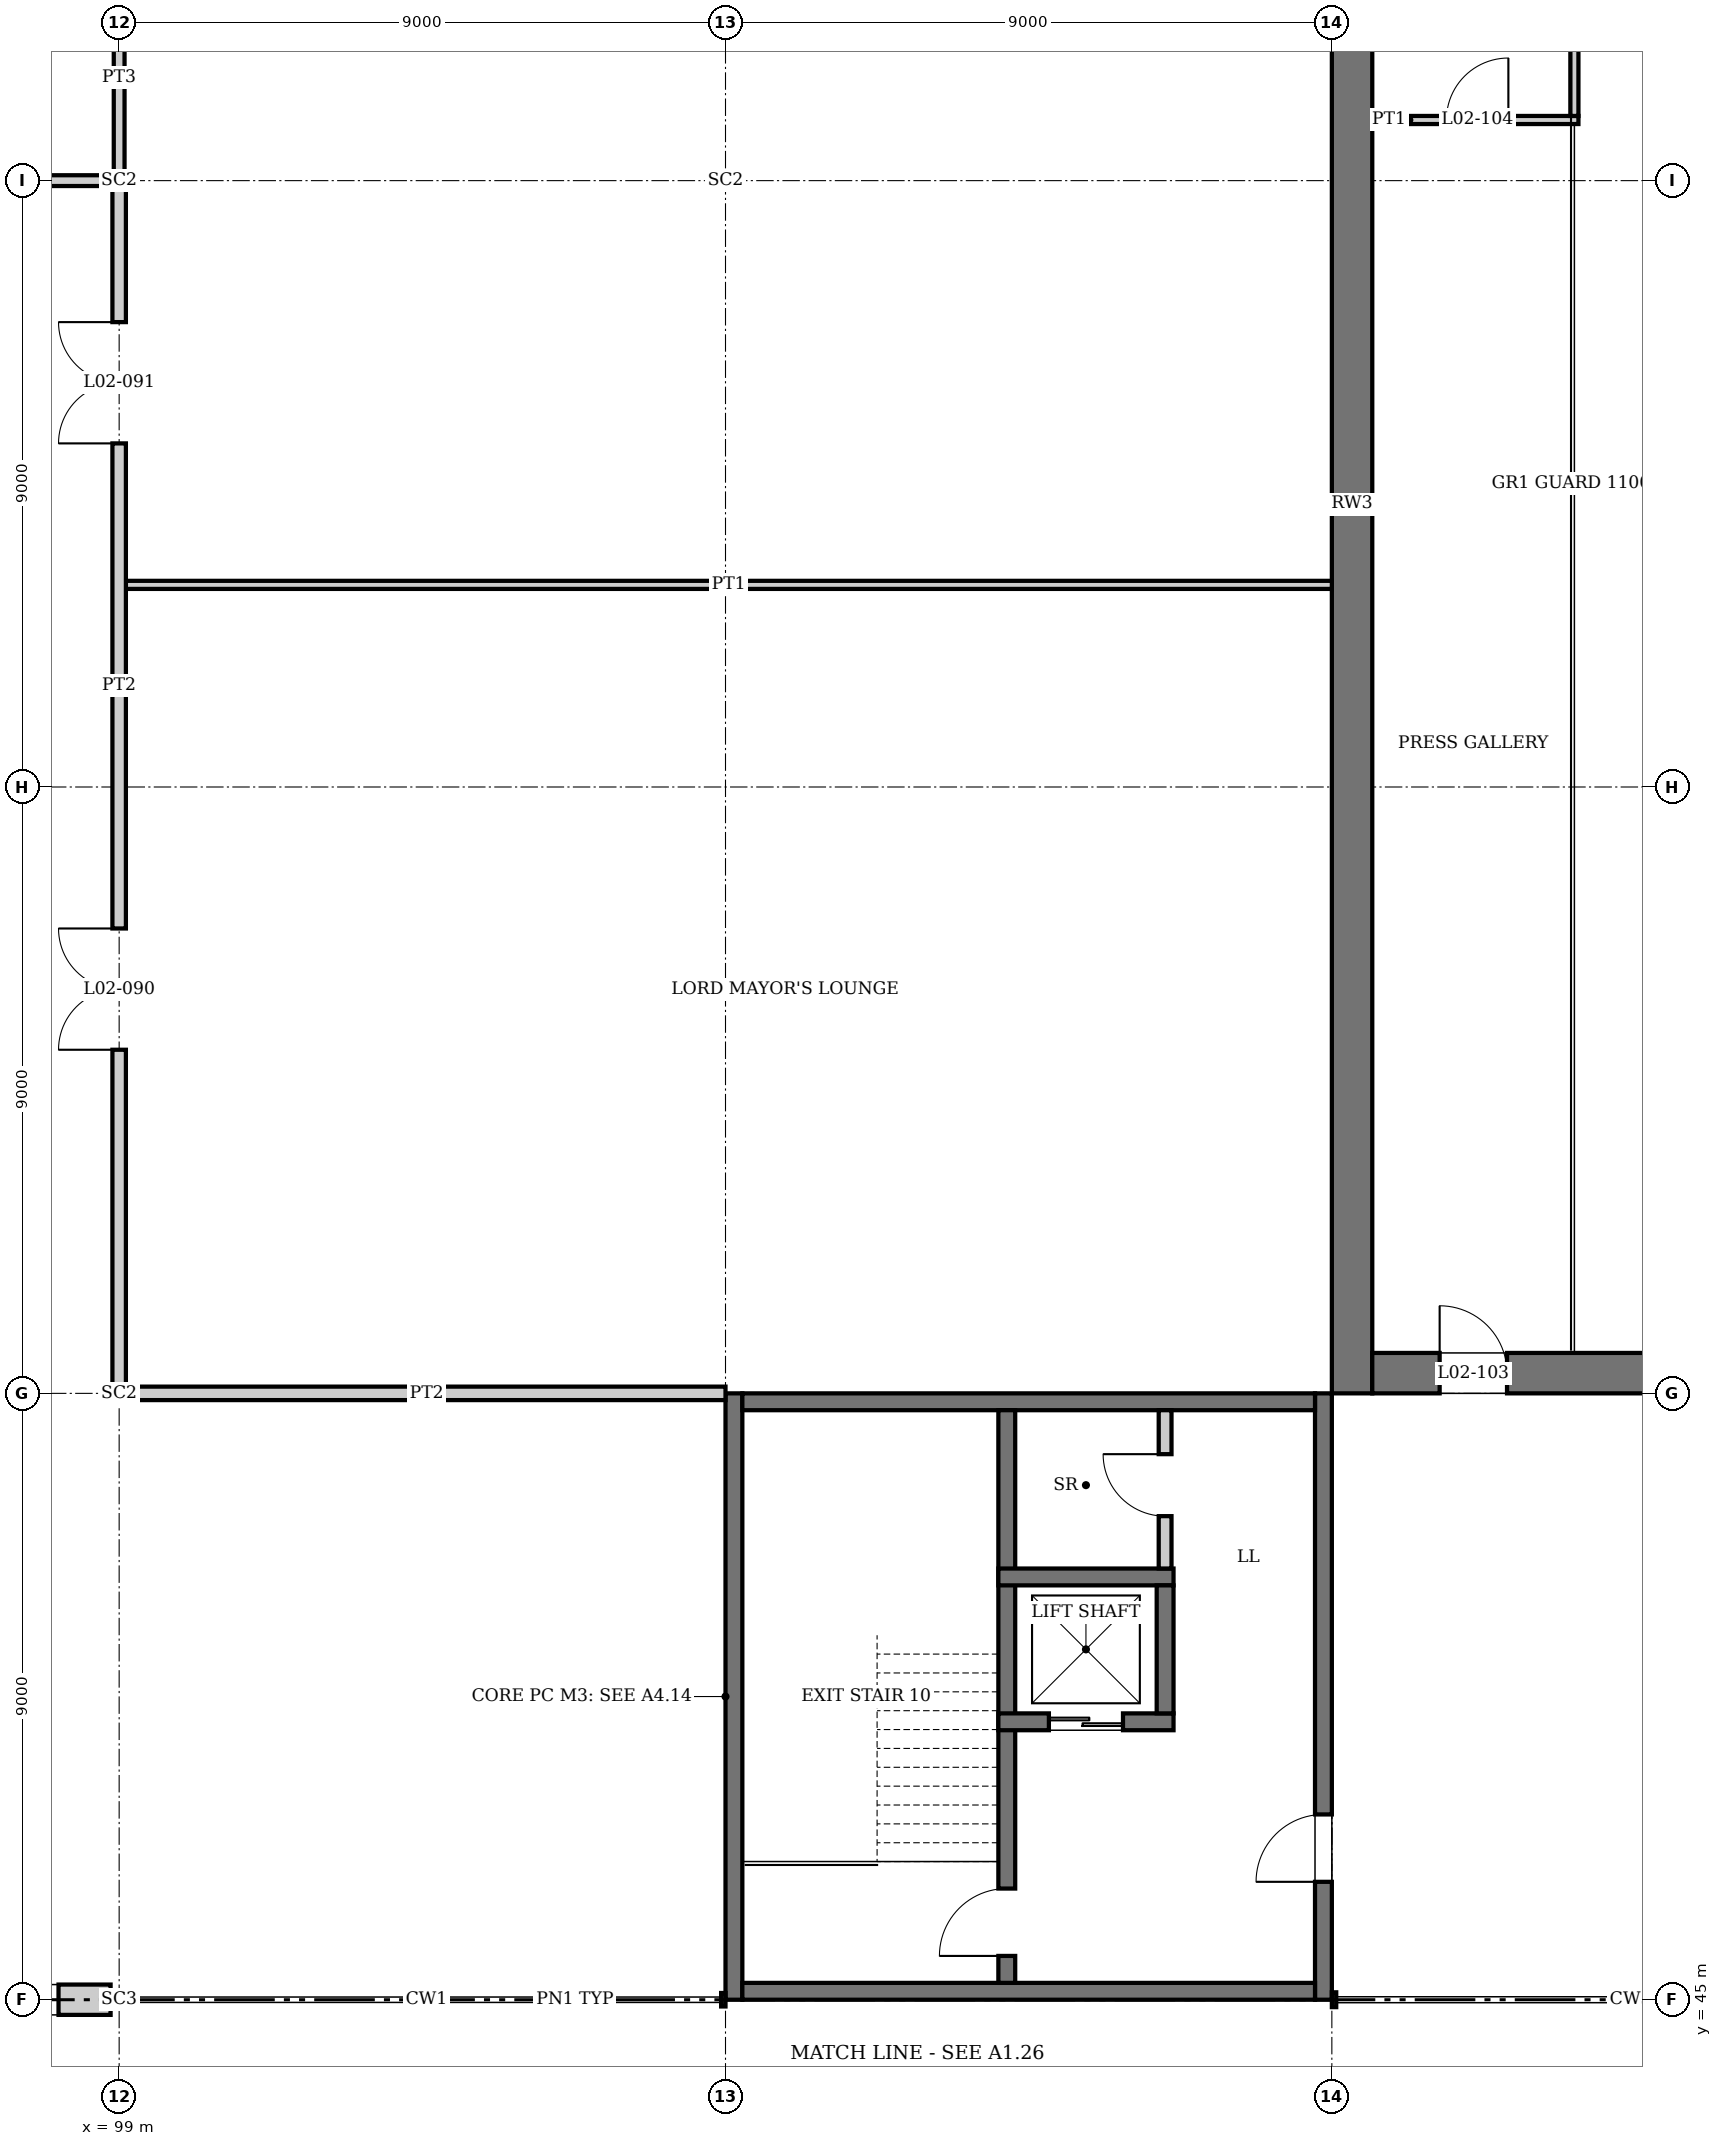
"""IFC4 building model, lengths in metres.
Left out: names, types, materials, properties, quantities, classifications, styles, units other than length and angle.
Written with IfcOpenShell. Run it as: python <this file> out.ifc"""

import sys

from ifc_helpers import new_model, si_unit, direction, frame, frame_2d, origin, origin_2d, place, context, subcontext, project, spatial, rectangle, i_section, extrude, element, fill, save


model = new_model("IFC4")
c1 = context("Model", 3, precision=1e-05, world=origin(), true_north=direction((0.0, 1.0)))
c2 = subcontext(c1, "Body", "Model", "MODEL_VIEW")
j1 = project(units=[si_unit("LENGTHUNIT", "METRE"), si_unit("PLANEANGLEUNIT", "RADIAN")], contexts=[c1])
p1 = place(None, origin())
s1 = spatial("IfcSite", under=j1, at=p1, CompositionType="ELEMENT")
p2 = place(p1, origin())
s2 = spatial("IfcBuilding", under=s1, at=p2, CompositionType="ELEMENT")
p3 = place(p2, frame((0.0, 0.0, 10.5)))
s3 = spatial("IfcBuildingStorey", under=s2, at=p3, CompositionType="ELEMENT", Elevation=10.5)
p4 = place(p3, frame((99.0, 45.0, 0.0), z_axis=(0.0, 0.0, 1.0), x_axis=(0.0, 1.0, 0.0)))
e1 = element("IfcColumn", 1, at=p4, inside=s3, PredefinedType="COLUMN", context=c2, shape_type="SweptSolid", body=[
    extrude(i_section(OverallWidth=0.254, OverallDepth=0.254, WebThickness=0.009, FlangeThickness=0.014, at=origin_2d()), origin(), (0.0, 0.0, 1.0), 4.5),
])
for number, where, z_axis, x_axis in (
    (2, (99.0, 54.0, 0.0), (0.0, 0.0, 1.0), (0.0, 1.0, 0.0)),
    (3, (99.0, 72.0, 0.0), (0.0, 0.0, 1.0), (0.0, 1.0, 0.0)),
    (4, (108.0, 72.0, 0.0), (0.0, 0.0, 1.0), (0.0, 1.0, 0.0)),
):
    element("IfcColumn", number, at=place(p3, frame(where, z_axis=z_axis, x_axis=x_axis)), inside=s3, PredefinedType="COLUMN", context=c2, shape_type="SweptSolid", body=[
        extrude(i_section(OverallWidth=0.256, OverallDepth=0.26, WebThickness=0.01, FlangeThickness=0.017, at=origin_2d()), origin(), (0.0, 0.0, 1.0), 4.5),
    ])
p5 = place(p3, frame((108.125, 45.0, 0.0), z_axis=(0.0, 0.0, 1.0), x_axis=(0.0, 1.0, 0.0)))
e5 = element("IfcWall", 5, at=p5, inside=s3, PredefinedType="SHEAR", context=c2, shape_type="SweptSolid", body=[
    extrude(rectangle(XDim=9.0, YDim=0.25, at=frame_2d((4.5, 0.0))), origin(), (0.0, 0.0, 1.0), 4.35),
])
p6 = place(p3, frame((116.875, 45.0, 0.0), z_axis=(0.0, 0.0, 1.0), x_axis=(0.0, 1.0, 0.0)))
e6 = element("IfcWall", 6, at=p6, inside=s3, PredefinedType="SHEAR", context=c2, shape_type="SweptSolid", body=[
    extrude(rectangle(XDim=9.0, YDim=0.25, at=frame_2d((4.5, 0.0))), origin(), (0.0, 0.0, 1.0), 4.35),
])
p7 = place(p6, frame((1.75, 0.0, 0.0)))
e7 = element("IfcOpeningElement", 7, at=p7, cuts=e6, PredefinedType="OPENING", context=c2, shape_type="SweptSolid", body=[
    extrude(rectangle(XDim=1.0, YDim=2.1, at=frame_2d((0.5, 1.05))), frame((0.0, 0.135, 0.0), z_axis=(0.0, -1.0, 0.0), x_axis=(1.0, 0.0, 0.0)), (0.0, 0.0, 1.0), 0.27),
])
for number, where, z_axis, x_axis in (
    (8, (108.25, 45.125, 0.0), (0.0, 0.0, 1.0), (1.0, 0.0, 0.0)),
    (9, (108.25, 53.875, 0.0), (0.0, 0.0, 1.0), (1.0, 0.0, 0.0)),
):
    element("IfcWall", number, at=place(p3, frame(where, z_axis=z_axis, x_axis=x_axis)), inside=s3, PredefinedType="SHEAR", context=c2, shape_type="SweptSolid", body=[
        extrude(rectangle(XDim=8.5, YDim=0.25, at=frame_2d((4.25, 0.0))), origin(), (0.0, 0.0, 1.0), 4.35),
    ])
p8 = place(p3, frame((117.3, 54.0, 0.0), z_axis=(0.0, 0.0, 1.0), x_axis=(0.0, 1.0, 0.0)))
e10 = element("IfcWall", 10, at=p8, inside=s3, PredefinedType="SHEAR", context=c2, shape_type="SweptSolid", body=[
    extrude(rectangle(XDim=26.4, YDim=0.6, at=frame_2d((13.2, 0.0))), origin(), (0.0, 0.0, 1.0), 4.5),
])
p9 = place(p3, frame((117.6, 54.3, 0.0), z_axis=(0.0, 0.0, 1.0), x_axis=(1.0, 0.0, 0.0)))
e11 = element("IfcWall", 11, at=p9, inside=s3, PredefinedType="SHEAR", context=c2, shape_type="SweptSolid", body=[
    extrude(rectangle(XDim=25.8, YDim=0.6, at=frame_2d((12.9, 0.0))), origin(), (0.0, 0.0, 1.0), 4.5),
])
p10 = place(p9, frame((1.0, 0.0, 0.0)))
e12 = element("IfcOpeningElement", 12, at=p10, cuts=e11, PredefinedType="OPENING", context=c2, shape_type="SweptSolid", body=[
    extrude(rectangle(XDim=1.0, YDim=2.1, at=frame_2d((0.5, 1.05))), frame((0.0, 0.31, 0.0), z_axis=(0.0, -1.0, 0.0), x_axis=(1.0, 0.0, 0.0)), (0.0, 0.0, 1.0), 0.62),
])
p11 = place(p3, frame((90.127, 45.0, 0.0), z_axis=(0.0, 0.0, 1.0), x_axis=(1.0, 0.0, 0.0)))
e13 = element("IfcWall", 13, at=p11, inside=s3, PredefinedType="SOLIDWALL", context=c2, shape_type="SweptSolid", body=[
    extrude(rectangle(XDim=8.746, YDim=0.45, at=frame_2d((4.373, 0.0))), origin(), (0.0, 0.0, 1.0), 3.991),
])
p12 = place(p11, frame((0.773, 0.0, 0.6)))
e14 = element("IfcOpeningElement", 14, at=p12, cuts=e13, PredefinedType="OPENING", context=c2, shape_type="SweptSolid", body=[
    extrude(rectangle(XDim=2.7, YDim=2.7, at=frame_2d((1.35, 1.35))), frame((0.0, 0.235, 0.0), z_axis=(0.0, -1.0, 0.0), x_axis=(1.0, 0.0, 0.0)), (0.0, 0.0, 1.0), 0.47),
])
p13 = place(p11, frame((5.273, 0.0, 0.6)))
e15 = element("IfcOpeningElement", 15, at=p13, cuts=e13, PredefinedType="OPENING", context=c2, shape_type="SweptSolid", body=[
    extrude(rectangle(XDim=2.7, YDim=2.7, at=frame_2d((1.35, 1.35))), frame((0.0, 0.235, 0.0), z_axis=(0.0, -1.0, 0.0), x_axis=(1.0, 0.0, 0.0)), (0.0, 0.0, 1.0), 0.47),
])
p14 = place(p3, frame((112.175, 45.25, 0.0), z_axis=(0.0, 0.0, 1.0), x_axis=(0.0, 1.0, 0.0)))
e16 = element("IfcWall", 16, at=p14, inside=s3, PredefinedType="SOLIDWALL", context=c2, shape_type="SweptSolid", body=[
    extrude(rectangle(XDim=8.5, YDim=0.25, at=frame_2d((4.25, 0.0))), origin(), (0.0, 0.0, 1.0), 4.35),
])
p15 = place(p14, frame((0.4, 0.0, 0.0)))
e17 = element("IfcOpeningElement", 17, at=p15, cuts=e16, PredefinedType="OPENING", context=c2, shape_type="SweptSolid", body=[
    extrude(rectangle(XDim=1.0, YDim=2.1, at=frame_2d((0.5, 1.05))), frame((0.0, 0.135, 0.0), z_axis=(0.0, -1.0, 0.0), x_axis=(1.0, 0.0, 0.0)), (0.0, 0.0, 1.0), 0.27),
])
p16 = place(p3, frame((112.05, 49.125, 0.0), z_axis=(0.0, 0.0, 1.0), x_axis=(1.0, 0.0, 0.0)))
e18 = element("IfcWall", 18, at=p16, inside=s3, PredefinedType="SOLIDWALL", context=c2, shape_type="SweptSolid", body=[
    extrude(rectangle(XDim=2.6, YDim=0.25, at=frame_2d((1.3, 0.0))), origin(), (0.0, 0.0, 1.0), 4.35),
])
p17 = place(p16, frame((0.75, 0.0, 0.0)))
e19 = element("IfcOpeningElement", 19, at=p17, cuts=e18, PredefinedType="OPENING", context=c2, shape_type="SweptSolid", body=[
    extrude(rectangle(XDim=1.1, YDim=2.1, at=frame_2d((0.55, 1.05))), frame((0.0, 0.135, 0.0), z_axis=(0.0, -1.0, 0.0), x_axis=(1.0, 0.0, 0.0)), (0.0, 0.0, 1.0), 0.27),
])
p18 = place(p3, frame((112.05, 51.275, 0.0), z_axis=(0.0, 0.0, 1.0), x_axis=(1.0, 0.0, 0.0)))
e20 = element("IfcWall", 20, at=p18, inside=s3, PredefinedType="SOLIDWALL", context=c2, shape_type="SweptSolid", body=[
    extrude(rectangle(XDim=2.6, YDim=0.25, at=frame_2d((1.3, 0.0))), origin(), (0.0, 0.0, 1.0), 4.35),
])
p19 = place(p3, frame((114.525, 49.25, 0.0), z_axis=(0.0, 0.0, 1.0), x_axis=(0.0, 1.0, 0.0)))
e21 = element("IfcWall", 21, at=p19, inside=s3, PredefinedType="SOLIDWALL", context=c2, shape_type="SweptSolid", body=[
    extrude(rectangle(XDim=1.9, YDim=0.25, at=frame_2d((0.95, 0.0))), origin(), (0.0, 0.0, 1.0), 4.35),
])
p20 = place(p3, frame((99.13, 54.0, 0.0), z_axis=(0.0, 0.0, 1.0), x_axis=(1.0, 0.0, 0.0)))
e22 = element("IfcWall", 22, at=p20, inside=s3, PredefinedType="PARTITIONING", context=c2, shape_type="SweptSolid", body=[
    extrude(rectangle(XDim=8.87, YDim=0.2, at=frame_2d((4.435, 0.0))), origin(), (0.0, 0.0, 1.0), 3.738),
])
p21 = place(p3, frame((99.1, 66.0, 0.0), z_axis=(0.0, 0.0, 1.0), x_axis=(1.0, 0.0, 0.0)))
e23 = element("IfcWall", 23, at=p21, inside=s3, PredefinedType="PARTITIONING", context=c2, shape_type="SweptSolid", body=[
    extrude(rectangle(XDim=17.9, YDim=0.12, at=frame_2d((8.95, 0.0))), origin(), (0.0, 0.0, 1.0), 3.65),
])
p22 = place(p3, frame((90.0, 72.0, 0.0), z_axis=(0.0, 0.0, 1.0), x_axis=(1.0, 0.0, 0.0)))
e24 = element("IfcWall", 24, at=p22, inside=s3, PredefinedType="PARTITIONING", context=c2, shape_type="SweptSolid", body=[
    extrude(rectangle(XDim=8.87, YDim=0.16, at=frame_2d((4.435, 0.0))), origin(), (0.0, 0.0, 1.0), 3.738),
])
p23 = place(p22, frame((4.1, 0.0, 0.0)))
e25 = element("IfcOpeningElement", 25, at=p23, cuts=e24, PredefinedType="OPENING", context=c2, shape_type="SweptSolid", body=[
    extrude(rectangle(XDim=1.0, YDim=2.1, at=frame_2d((0.5, 1.05))), frame((0.0, 0.09, 0.0), z_axis=(0.0, -1.0, 0.0), x_axis=(1.0, 0.0, 0.0)), (0.0, 0.0, 1.0), 0.18),
])
p24 = place(p3, frame((117.6, 72.9, 0.0), z_axis=(0.0, 0.0, 1.0), x_axis=(1.0, 0.0, 0.0)))
e26 = element("IfcWall", 26, at=p24, inside=s3, PredefinedType="PARTITIONING", context=c2, shape_type="SweptSolid", body=[
    extrude(rectangle(XDim=3.06, YDim=0.12, at=frame_2d((1.53, 0.0))), origin(), (0.0, 0.0, 1.0), 7.1),
])
p25 = place(p24, frame((1.1, 0.0, 0.0)))
e27 = element("IfcOpeningElement", 27, at=p25, cuts=e26, PredefinedType="OPENING", context=c2, shape_type="SweptSolid", body=[
    extrude(rectangle(XDim=0.92, YDim=2.1, at=frame_2d((0.46, 1.05))), frame((0.0, 0.07, 0.0), z_axis=(0.0, -1.0, 0.0), x_axis=(1.0, 0.0, 0.0)), (0.0, 0.0, 1.0), 0.14),
])
p26 = place(p3, frame((99.0, 54.13, 0.0), z_axis=(0.0, 0.0, 1.0), x_axis=(0.0, 1.0, 0.0)))
e28 = element("IfcWall", 28, at=p26, inside=s3, PredefinedType="PARTITIONING", context=c2, shape_type="SweptSolid", body=[
    extrude(rectangle(XDim=17.74, YDim=0.2, at=frame_2d((8.87, 0.0))), origin(), (0.0, 0.0, 1.0), 3.65),
])
p27 = place(p26, frame((4.97, 0.0, 0.0)))
e29 = element("IfcOpeningElement", 29, at=p27, cuts=e28, PredefinedType="OPENING", context=c2, shape_type="SweptSolid", body=[
    extrude(rectangle(XDim=1.8, YDim=2.1, at=frame_2d((0.9, 1.05))), frame((0.0, 0.11, 0.0), z_axis=(0.0, -1.0, 0.0), x_axis=(1.0, 0.0, 0.0)), (0.0, 0.0, 1.0), 0.22),
])
p28 = place(p26, frame((13.97, 0.0, 0.0)))
e30 = element("IfcOpeningElement", 30, at=p28, cuts=e28, PredefinedType="OPENING", context=c2, shape_type="SweptSolid", body=[
    extrude(rectangle(XDim=1.8, YDim=2.1, at=frame_2d((0.9, 1.05))), frame((0.0, 0.11, 0.0), z_axis=(0.0, -1.0, 0.0), x_axis=(1.0, 0.0, 0.0)), (0.0, 0.0, 1.0), 0.22),
])
p29 = place(p3, frame((99.0, 72.13, 0.0), z_axis=(0.0, 0.0, 1.0), x_axis=(0.0, 1.0, 0.0)))
e31 = element("IfcWall", 31, at=p29, inside=s3, PredefinedType="PARTITIONING", context=c2, shape_type="SweptSolid", body=[
    extrude(rectangle(XDim=2.79, YDim=0.16, at=frame_2d((1.395, 0.0))), origin(), (0.0, 0.0, 1.0), 4.043),
])
p30 = place(p3, frame((114.525, 51.4, 0.0), z_axis=(0.0, 0.0, 1.0), x_axis=(0.0, 1.0, 0.0)))
e32 = element("IfcWall", 32, at=p30, inside=s3, PredefinedType="PARTITIONING", context=c2, shape_type="SweptSolid", body=[
    extrude(rectangle(XDim=2.35, YDim=0.19, at=frame_2d((1.175, 0.0))), origin(), (0.0, 0.0, 1.0), 4.35),
])
p31 = place(p30, frame((0.778, 0.0, 0.0)))
e33 = element("IfcOpeningElement", 33, at=p31, cuts=e32, PredefinedType="OPENING", context=c2, shape_type="SweptSolid", body=[
    extrude(rectangle(XDim=0.92, YDim=2.1, at=frame_2d((0.46, 1.05))), frame((0.0, 0.105, 0.0), z_axis=(0.0, -1.0, 0.0), x_axis=(1.0, 0.0, 0.0)), (0.0, 0.0, 1.0), 0.21),
])
p32 = place(p3, frame((120.6, 72.96, 0.0), z_axis=(0.0, 0.0, 1.0), x_axis=(0.0, 1.0, 0.0)))
e34 = element("IfcWall", 34, at=p32, inside=s3, PredefinedType="PARTITIONING", context=c2, shape_type="SweptSolid", body=[
    extrude(rectangle(XDim=7.44, YDim=0.12, at=frame_2d((3.72, 0.0))), origin(), (0.0, 0.0, 1.0), 7.1),
])
p33 = place(p13, origin())
e35 = element("IfcWindow", 35, at=p33, inside=s3, PartitioningType="SINGLE_PANEL", PredefinedType="WINDOW", context=c2, shape_type="SweptSolid", body=[
    extrude(rectangle(XDim=2.7, YDim=2.7, at=frame_2d((1.35, 1.35))), frame((0.0, 0.03, 0.0), z_axis=(0.0, -1.0, 0.0), x_axis=(1.0, 0.0, 0.0)), (0.0, 0.0, 1.0), 0.06),
])
fill(e15, e35)
p34 = place(p17, origin())
e36 = element("IfcDoor", 36, at=p34, inside=s3, OperationType="DOUBLE_DOOR_SLIDING", PredefinedType="DOOR", context=c2, shape_type="SweptSolid", body=[
    extrude(rectangle(XDim=1.1, YDim=2.1, at=frame_2d((0.55, 1.05))), frame((0.0, 0.025, 0.0), z_axis=(0.0, -1.0, 0.0), x_axis=(1.0, 0.0, 0.0)), (0.0, 0.0, 1.0), 0.05),
])
fill(e19, e36)
p35 = place(p15, origin())
e37 = element("IfcDoor", 37, at=p35, inside=s3, OperationType="SINGLE_SWING_LEFT", PredefinedType="DOOR", context=c2, shape_type="SweptSolid", body=[
    extrude(rectangle(XDim=1.0, YDim=2.1, at=frame_2d((0.5, 1.05))), frame((0.0, 0.025, 0.0), z_axis=(0.0, -1.0, 0.0), x_axis=(1.0, 0.0, 0.0)), (0.0, 0.0, 1.0), 0.05),
])
fill(e17, e37)
p36 = place(p7, origin())
e38 = element("IfcDoor", 38, at=p36, inside=s3, OperationType="SINGLE_SWING_LEFT", PredefinedType="DOOR", context=c2, shape_type="SweptSolid", body=[
    extrude(rectangle(XDim=1.0, YDim=2.1, at=frame_2d((0.5, 1.05))), frame((0.0, 0.025, 0.0), z_axis=(0.0, -1.0, 0.0), x_axis=(1.0, 0.0, 0.0)), (0.0, 0.0, 1.0), 0.05),
])
fill(e7, e38)
p37 = place(p31, origin())
e39 = element("IfcDoor", 39, at=p37, inside=s3, OperationType="SINGLE_SWING_RIGHT", PredefinedType="DOOR", context=c2, shape_type="SweptSolid", body=[
    extrude(rectangle(XDim=0.92, YDim=2.1, at=frame_2d((0.46, 1.05))), frame((0.0, 0.025, 0.0), z_axis=(0.0, -1.0, 0.0), x_axis=(1.0, 0.0, 0.0)), (0.0, 0.0, 1.0), 0.05),
])
fill(e33, e39)
p38 = place(p27, origin())
e40 = element("IfcDoor", 40, at=p38, inside=s3, OperationType="DOUBLE_DOOR_SINGLE_SWING", PredefinedType="DOOR", context=c2, shape_type="SweptSolid", body=[
    extrude(rectangle(XDim=1.8, YDim=2.1, at=frame_2d((0.9, 1.05))), frame((0.0, 0.025, 0.0), z_axis=(0.0, -1.0, 0.0), x_axis=(1.0, 0.0, 0.0)), (0.0, 0.0, 1.0), 0.05),
])
fill(e29, e40)
p39 = place(p28, origin())
e41 = element("IfcDoor", 41, at=p39, inside=s3, OperationType="DOUBLE_DOOR_SINGLE_SWING", PredefinedType="DOOR", context=c2, shape_type="SweptSolid", body=[
    extrude(rectangle(XDim=1.8, YDim=2.1, at=frame_2d((0.9, 1.05))), frame((0.0, 0.025, 0.0), z_axis=(0.0, -1.0, 0.0), x_axis=(1.0, 0.0, 0.0)), (0.0, 0.0, 1.0), 0.05),
])
fill(e30, e41)
p40 = place(p10, origin())
e42 = element("IfcDoor", 42, at=p40, inside=s3, OperationType="SINGLE_SWING_LEFT", PredefinedType="DOOR", context=c2, shape_type="SweptSolid", body=[
    extrude(rectangle(XDim=1.0, YDim=2.1, at=frame_2d((0.5, 1.05))), frame((0.0, 0.025, 0.0), z_axis=(0.0, -1.0, 0.0), x_axis=(1.0, 0.0, 0.0)), (0.0, 0.0, 1.0), 0.05),
])
fill(e12, e42)
p41 = place(p25, origin())
e43 = element("IfcDoor", 43, at=p41, inside=s3, OperationType="SINGLE_SWING_RIGHT", PredefinedType="DOOR", context=c2, shape_type="SweptSolid", body=[
    extrude(rectangle(XDim=0.92, YDim=2.1, at=frame_2d((0.46, 1.05))), frame((0.0, 0.025, 0.0), z_axis=(0.0, -1.0, 0.0), x_axis=(1.0, 0.0, 0.0)), (0.0, 0.0, 1.0), 0.05),
])
fill(e27, e43)
save(model, sys.argv[1])
